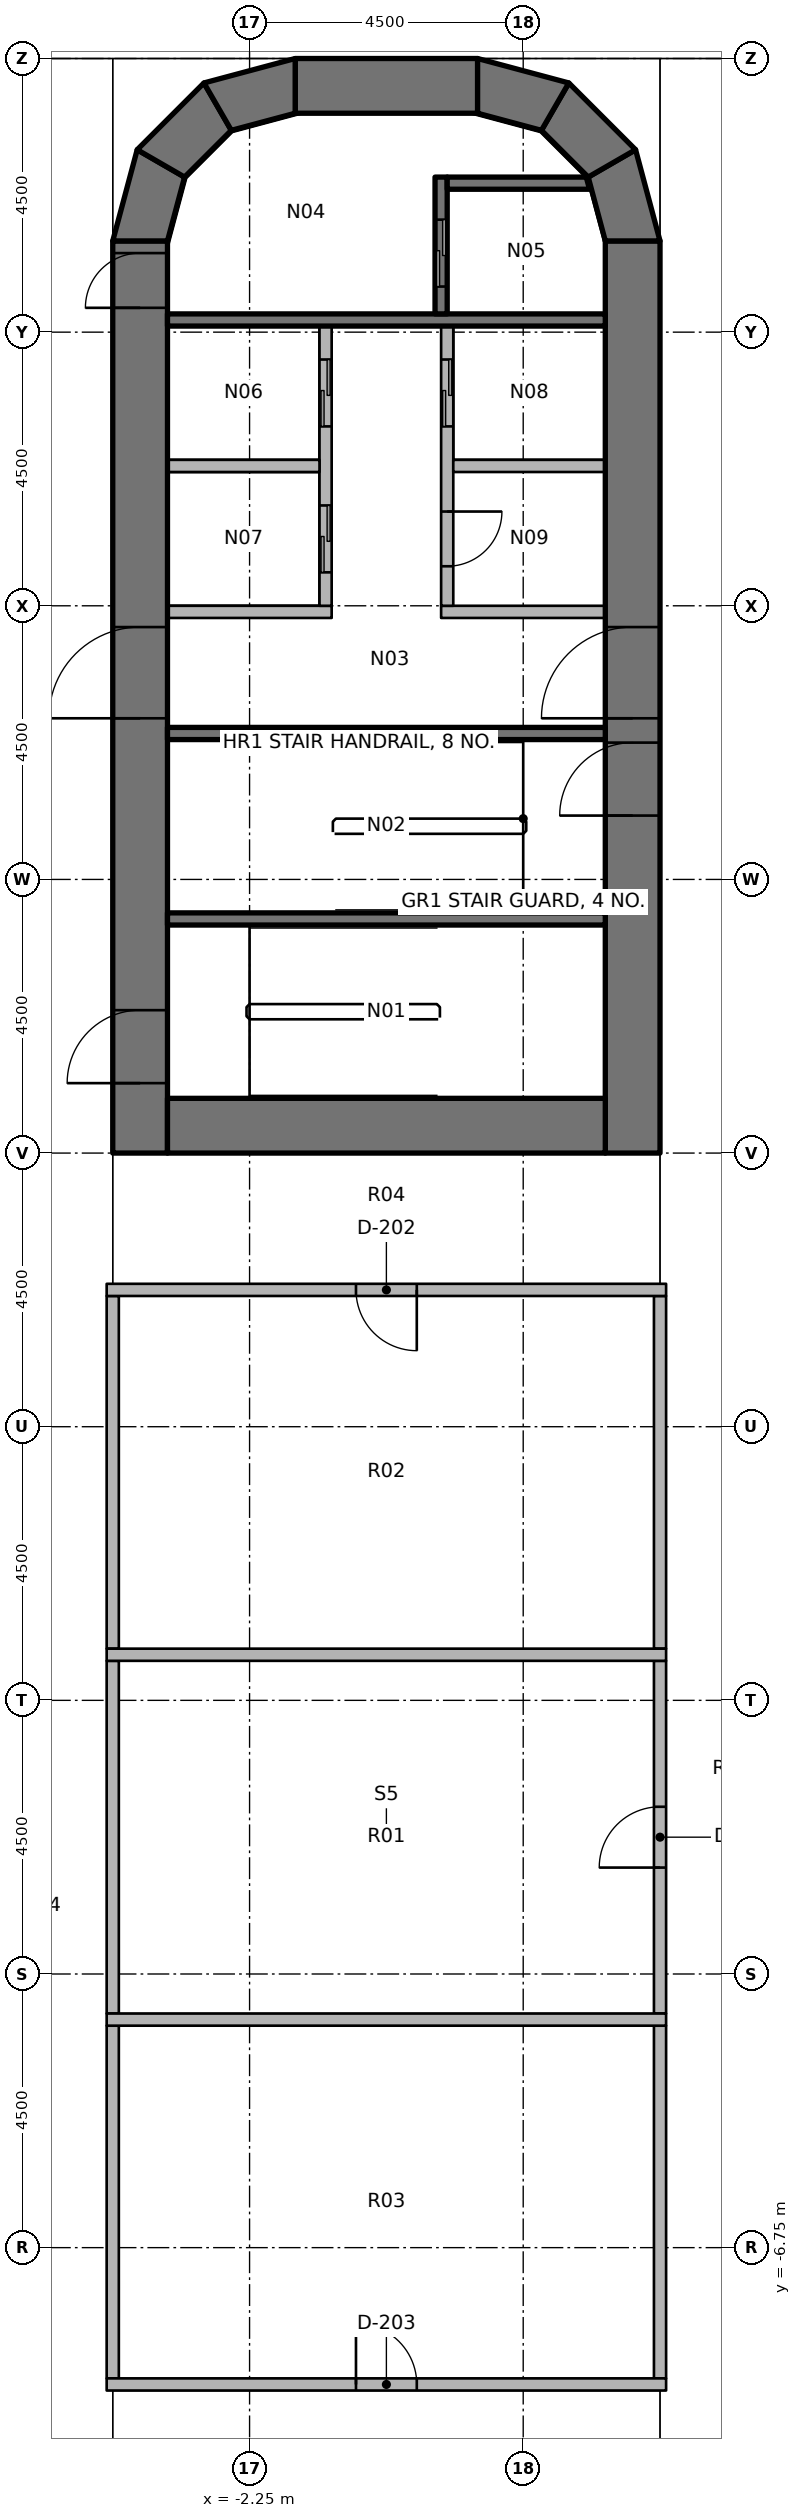
"""IFC4 building model, lengths in metres.
Left out: names, types, materials, properties, quantities, classifications, styles, units other than length and angle.
Written with IfcOpenShell. Run it as: python <this file> out.ifc"""

import sys

from ifc_helpers import new_model, si_unit, direction, frame, frame_2d, origin, place, context, subcontext, project, spatial, polyline, rectangle, outline, extrude, element, fill, save


model = new_model("IFC4")
c1 = context("Model", 3, precision=1e-05, world=origin(), true_north=direction((0.0, 1.0)))
c2 = subcontext(c1, "Body", "Model", "MODEL_VIEW")
j1 = project(units=[si_unit("LENGTHUNIT", "METRE"), si_unit("PLANEANGLEUNIT", "RADIAN")], contexts=[c1])
p1 = place(None, origin())
s1 = spatial("IfcSite", under=j1, at=p1, CompositionType="ELEMENT")
p2 = place(p1, origin())
s2 = spatial("IfcBuilding", under=s1, at=p2, CompositionType="ELEMENT")
p3 = place(p2, frame((0.0, 0.0, 31.2)))
s3 = spatial("IfcBuildingStorey", under=s2, at=p3, CompositionType="ELEMENT", Elevation=31.2)
p4 = place(p3, frame((-4.05, 11.25, 0.0), z_axis=(0.0, 0.0, 1.0), x_axis=(0.0, 1.0, 0.0)))
e1 = element("IfcWall", 1, at=p4, inside=s3, PredefinedType="SHEAR", context=c2, shape_type="SweptSolid", body=[
    extrude(rectangle(XDim=15.0, YDim=0.9, at=frame_2d((7.5, 0.0))), origin(), (0.0, 0.0, 1.0), 4.2),
])
p5 = place(p4, frame((7.15, 0.0, 0.0)))
e2 = element("IfcOpeningElement", 2, at=p5, cuts=e1, PredefinedType="OPENING", context=c2, shape_type="SweptSolid", body=[
    extrude(rectangle(XDim=1.5, YDim=2.3, at=frame_2d((0.75, 1.15))), frame((0.0, 0.46, 0.0), z_axis=(0.0, -1.0, 0.0), x_axis=(1.0, 0.0, 0.0)), (0.0, 0.0, 1.0), 0.92),
])
p6 = place(p4, frame((13.9, 0.0, 0.0)))
e3 = element("IfcOpeningElement", 3, at=p6, cuts=e1, PredefinedType="OPENING", context=c2, shape_type="SweptSolid", body=[
    extrude(rectangle(XDim=0.9, YDim=2.1, at=frame_2d((0.45, 1.05))), frame((0.0, 0.46, 0.0), z_axis=(0.0, -1.0, 0.0), x_axis=(1.0, 0.0, 0.0)), (0.0, 0.0, 1.0), 0.92),
])
p7 = place(p4, frame((1.15, 0.0, 0.0)))
e4 = element("IfcOpeningElement", 4, at=p7, cuts=e1, PredefinedType="OPENING", context=c2, shape_type="SweptSolid", body=[
    extrude(rectangle(XDim=1.2, YDim=2.1, at=frame_2d((0.6, 1.05))), frame((0.0, 0.46, 0.0), z_axis=(0.0, -1.0, 0.0), x_axis=(1.0, 0.0, 0.0)), (0.0, 0.0, 1.0), 0.92),
])
p8 = place(p3, frame((4.05, 11.25, 0.0), z_axis=(0.0, 0.0, 1.0), x_axis=(0.0, 1.0, 0.0)))
e5 = element("IfcWall", 5, at=p8, inside=s3, PredefinedType="SHEAR", context=c2, shape_type="SweptSolid", body=[
    extrude(rectangle(XDim=15.0, YDim=0.9, at=frame_2d((7.5, 0.0))), origin(), (0.0, 0.0, 1.0), 4.2),
])
p9 = place(p8, frame((7.15, 0.0, 0.0)))
e6 = element("IfcOpeningElement", 6, at=p9, cuts=e5, PredefinedType="OPENING", context=c2, shape_type="SweptSolid", body=[
    extrude(rectangle(XDim=1.5, YDim=2.3, at=frame_2d((0.75, 1.15))), frame((0.0, 0.46, 0.0), z_axis=(0.0, -1.0, 0.0), x_axis=(1.0, 0.0, 0.0)), (0.0, 0.0, 1.0), 0.92),
])
p10 = place(p8, frame((5.55, 0.0, 0.0)))
e7 = element("IfcOpeningElement", 7, at=p10, cuts=e5, PredefinedType="OPENING", context=c2, shape_type="SweptSolid", body=[
    extrude(rectangle(XDim=1.2, YDim=2.1, at=frame_2d((0.6, 1.05))), frame((0.0, 0.46, 0.0), z_axis=(0.0, -1.0, 0.0), x_axis=(1.0, 0.0, 0.0)), (0.0, 0.0, 1.0), 0.92),
])
p11 = place(p3, frame((-3.6, 11.7, 0.0), z_axis=(0.0, 0.0, 1.0), x_axis=(1.0, 0.0, 0.0)))
e8 = element("IfcWall", 8, at=p11, inside=s3, PredefinedType="SHEAR", context=c2, shape_type="SweptSolid", body=[
    extrude(rectangle(XDim=7.2, YDim=0.9, at=frame_2d((3.6, 0.0))), origin(), (0.0, 0.0, 1.0), 4.2),
])
p12 = place(p3, frame((-1.5, 28.8, 0.0), z_axis=(0.0, 0.0, 1.0), x_axis=(1.0, 0.0, 0.0)))
e9 = element("IfcWall", 9, at=p12, inside=s3, PredefinedType="SHEAR", context=c2, shape_type="SweptSolid", body=[
    extrude(rectangle(XDim=3.0, YDim=0.9, at=frame_2d((1.5, 0.0))), origin(), (0.0, 0.0, 1.0), 4.2),
])
p13 = place(p3, origin())
e10 = element("IfcWall", 10, at=p13, inside=s3, PredefinedType="SHEAR", context=c2, shape_type="SweptSolid", body=[
    extrude(outline(polyline([(-4.5, 26.25), (-4.098, 27.75), (-3.319, 27.3), (-3.6, 26.25), (-4.5, 26.25)])), origin(), (0.0, 0.0, 1.0), 4.2),
])
p14 = place(p3, origin())
e11 = element("IfcWall", 11, at=p14, inside=s3, PredefinedType="SHEAR", context=c2, shape_type="SweptSolid", body=[
    extrude(outline(polyline([(-4.098, 27.75), (-3.0, 28.848), (-2.55, 28.069), (-3.319, 27.3), (-4.098, 27.75)])), origin(), (0.0, 0.0, 1.0), 4.2),
])
p15 = place(p3, origin())
e12 = element("IfcWall", 12, at=p15, inside=s3, PredefinedType="SHEAR", context=c2, shape_type="SweptSolid", body=[
    extrude(outline(polyline([(-3.0, 28.848), (-1.5, 29.25), (-1.5, 28.35), (-2.55, 28.069), (-3.0, 28.848)])), origin(), (0.0, 0.0, 1.0), 4.2),
])
p16 = place(p3, origin())
e13 = element("IfcWall", 13, at=p16, inside=s3, PredefinedType="SHEAR", context=c2, shape_type="SweptSolid", body=[
    extrude(outline(polyline([(4.5, 26.25), (4.098, 27.75), (3.319, 27.3), (3.6, 26.25), (4.5, 26.25)])), origin(), (0.0, 0.0, 1.0), 4.2),
])
p17 = place(p3, origin())
e14 = element("IfcWall", 14, at=p17, inside=s3, PredefinedType="SHEAR", context=c2, shape_type="SweptSolid", body=[
    extrude(outline(polyline([(4.098, 27.75), (3.0, 28.848), (2.55, 28.069), (3.319, 27.3), (4.098, 27.75)])), origin(), (0.0, 0.0, 1.0), 4.2),
])
p18 = place(p3, origin())
e15 = element("IfcWall", 15, at=p18, inside=s3, PredefinedType="SHEAR", context=c2, shape_type="SweptSolid", body=[
    extrude(outline(polyline([(3.0, 28.848), (1.5, 29.25), (1.5, 28.35), (2.55, 28.069), (3.0, 28.848)])), origin(), (0.0, 0.0, 1.0), 4.2),
])
p19 = place(p3, frame((-3.6, 24.95, 0.0), z_axis=(0.0, 0.0, 1.0), x_axis=(1.0, 0.0, 0.0)))
e16 = element("IfcWall", 16, at=p19, inside=s3, PredefinedType="SHEAR", context=c2, shape_type="SweptSolid", body=[
    extrude(rectangle(XDim=7.2, YDim=0.2, at=frame_2d((3.6, 0.0))), origin(), (0.0, 0.0, 1.0), 4.05),
])
p20 = place(p3, frame((0.9, 27.3, 0.0), z_axis=(0.0, 0.0, 1.0), x_axis=(0.0, -1.0, 0.0)))
e17 = element("IfcWall", 17, at=p20, inside=s3, PredefinedType="SHEAR", context=c2, shape_type="SweptSolid", body=[
    extrude(rectangle(XDim=2.25, YDim=0.2, at=frame_2d((1.125, 0.0))), origin(), (0.0, 0.0, 1.0), 4.05),
])
p21 = place(p20, frame((0.7, 0.0, 0.0)))
e18 = element("IfcOpeningElement", 18, at=p21, cuts=e17, PredefinedType="OPENING", context=c2, shape_type="SweptSolid", body=[
    extrude(rectangle(XDim=1.1, YDim=2.3, at=frame_2d((0.55, 1.15))), frame((0.0, 0.11, 0.0), z_axis=(0.0, -1.0, 0.0), x_axis=(1.0, 0.0, 0.0)), (0.0, 0.0, 1.0), 0.22),
])
p22 = place(p3, origin())
e19 = element("IfcWall", 19, at=p22, inside=s3, PredefinedType="SHEAR", context=c2, shape_type="SweptSolid", body=[
    extrude(outline(polyline([(1.0, 27.1), (3.341, 27.1), (3.291, 27.284), (3.275, 27.3), (1.0, 27.3), (1.0, 27.1)])), origin(), (0.0, 0.0, 1.0), 4.05),
])
for number, where, z_axis, x_axis in (
    (20, (-3.6, 18.15, 0.0), (0.0, 0.0, 1.0), (1.0, 0.0, 0.0)),
    (21, (-3.6, 15.1, 0.0), (0.0, 0.0, 1.0), (1.0, 0.0, 0.0)),
):
    element("IfcWall", number, at=place(p3, frame(where, z_axis=z_axis, x_axis=x_axis)), inside=s3, PredefinedType="SHEAR", context=c2, shape_type="SweptSolid", body=[
        extrude(rectangle(XDim=7.2, YDim=0.2, at=frame_2d((3.6, 0.0))), origin(), (0.0, 0.0, 1.0), 4.05),
    ])
p23 = place(p3, frame((-3.6, 20.15, 0.0), z_axis=(0.0, 0.0, 1.0), x_axis=(1.0, 0.0, 0.0)))
e22 = element("IfcWall", 22, at=p23, inside=s3, PredefinedType="PARTITIONING", context=c2, shape_type="SweptSolid", body=[
    extrude(rectangle(XDim=2.7, YDim=0.2, at=frame_2d((1.35, 0.0))), origin(), (0.0, 0.0, 1.0), 4.05),
])
p24 = place(p3, frame((-1.0, 24.85, 0.0), z_axis=(0.0, 0.0, 1.0), x_axis=(0.0, -1.0, 0.0)))
e23 = element("IfcWall", 23, at=p24, inside=s3, PredefinedType="PARTITIONING", context=c2, shape_type="SweptSolid", body=[
    extrude(rectangle(XDim=4.6, YDim=0.2, at=frame_2d((2.3, 0.0))), origin(), (0.0, 0.0, 1.0), 4.05),
])
p25 = place(p24, frame((0.55, 0.0, 0.0)))
e24 = element("IfcOpeningElement", 24, at=p25, cuts=e23, PredefinedType="OPENING", context=c2, shape_type="SweptSolid", body=[
    extrude(rectangle(XDim=1.1, YDim=2.3, at=frame_2d((0.55, 1.15))), frame((0.0, 0.11, 0.0), z_axis=(0.0, -1.0, 0.0), x_axis=(1.0, 0.0, 0.0)), (0.0, 0.0, 1.0), 0.22),
])
p26 = place(p24, frame((2.95, 0.0, 0.0)))
e25 = element("IfcOpeningElement", 25, at=p26, cuts=e23, PredefinedType="OPENING", context=c2, shape_type="SweptSolid", body=[
    extrude(rectangle(XDim=1.1, YDim=2.3, at=frame_2d((0.55, 1.15))), frame((0.0, 0.11, 0.0), z_axis=(0.0, -1.0, 0.0), x_axis=(1.0, 0.0, 0.0)), (0.0, 0.0, 1.0), 0.22),
])
p27 = place(p3, frame((0.9, 20.15, 0.0), z_axis=(0.0, 0.0, 1.0), x_axis=(1.0, 0.0, 0.0)))
e26 = element("IfcWall", 26, at=p27, inside=s3, PredefinedType="PARTITIONING", context=c2, shape_type="SweptSolid", body=[
    extrude(rectangle(XDim=2.7, YDim=0.2, at=frame_2d((1.35, 0.0))), origin(), (0.0, 0.0, 1.0), 4.05),
])
p28 = place(p3, frame((1.0, 24.85, 0.0), z_axis=(0.0, 0.0, 1.0), x_axis=(0.0, -1.0, 0.0)))
e27 = element("IfcWall", 27, at=p28, inside=s3, PredefinedType="PARTITIONING", context=c2, shape_type="SweptSolid", body=[
    extrude(rectangle(XDim=4.6, YDim=0.2, at=frame_2d((2.3, 0.0))), origin(), (0.0, 0.0, 1.0), 4.05),
])
p29 = place(p28, frame((0.55, 0.0, 0.0)))
e28 = element("IfcOpeningElement", 28, at=p29, cuts=e27, PredefinedType="OPENING", context=c2, shape_type="SweptSolid", body=[
    extrude(rectangle(XDim=1.1, YDim=2.3, at=frame_2d((0.55, 1.15))), frame((0.0, 0.11, 0.0), z_axis=(0.0, -1.0, 0.0), x_axis=(1.0, 0.0, 0.0)), (0.0, 0.0, 1.0), 0.22),
])
p30 = place(p28, frame((3.05, 0.0, 0.0)))
e29 = element("IfcOpeningElement", 29, at=p30, cuts=e27, PredefinedType="OPENING", context=c2, shape_type="SweptSolid", body=[
    extrude(rectangle(XDim=0.9, YDim=2.1, at=frame_2d((0.45, 1.05))), frame((0.0, 0.11, 0.0), z_axis=(0.0, -1.0, 0.0), x_axis=(1.0, 0.0, 0.0)), (0.0, 0.0, 1.0), 0.22),
])
for number, where, z_axis, x_axis in (
    (30, (-3.6, 22.55, 0.0), (0.0, 0.0, 1.0), (1.0, 0.0, 0.0)),
    (31, (1.1, 22.55, 0.0), (0.0, 0.0, 1.0), (1.0, 0.0, 0.0)),
):
    element("IfcWall", number, at=place(p3, frame(where, z_axis=z_axis, x_axis=x_axis)), inside=s3, PredefinedType="PARTITIONING", context=c2, shape_type="SweptSolid", body=[
        extrude(rectangle(XDim=2.5, YDim=0.2, at=frame_2d((1.25, 0.0))), origin(), (0.0, 0.0, 1.0), 4.05),
    ])
for number, where, z_axis, x_axis in (
    (32, (-4.5, 3.1, 0.0), (0.0, 0.0, 1.0), (0.0, 1.0, 0.0)),
    (33, (-4.5, -2.9, 0.0), (0.0, 0.0, 1.0), (0.0, 1.0, 0.0)),
    (34, (-4.5, -8.9, 0.0), (0.0, 0.0, 1.0), (0.0, 1.0, 0.0)),
    (35, (4.5, 3.1, 0.0), (0.0, 0.0, 1.0), (0.0, 1.0, 0.0)),
):
    element("IfcWall", number, at=place(p3, frame(where, z_axis=z_axis, x_axis=x_axis)), inside=s3, PredefinedType="PARTITIONING", context=c2, shape_type="SweptSolid", body=[
        extrude(rectangle(XDim=5.8, YDim=0.2, at=frame_2d((2.9, 0.0))), origin(), (0.0, 0.0, 1.0), 3.131),
    ])
p31 = place(p3, frame((4.5, -2.9, 0.0), z_axis=(0.0, 0.0, 1.0), x_axis=(0.0, 1.0, 0.0)))
e36 = element("IfcWall", 36, at=p31, inside=s3, PredefinedType="PARTITIONING", context=c2, shape_type="SweptSolid", body=[
    extrude(rectangle(XDim=5.8, YDim=0.2, at=frame_2d((2.9, 0.0))), origin(), (0.0, 0.0, 1.0), 3.131),
])
p32 = place(p31, frame((2.4, 0.0, 0.0)))
e37 = element("IfcOpeningElement", 37, at=p32, cuts=e36, PredefinedType="OPENING", context=c2, shape_type="SweptSolid", body=[
    extrude(rectangle(XDim=1.0, YDim=2.1, at=frame_2d((0.5, 1.05))), frame((0.0, 0.11, 0.0), z_axis=(0.0, -1.0, 0.0), x_axis=(1.0, 0.0, 0.0)), (0.0, 0.0, 1.0), 0.22),
])
p33 = place(p3, frame((4.5, -8.9, 0.0), z_axis=(0.0, 0.0, 1.0), x_axis=(0.0, 1.0, 0.0)))
e38 = element("IfcWall", 38, at=p33, inside=s3, PredefinedType="PARTITIONING", context=c2, shape_type="SweptSolid", body=[
    extrude(rectangle(XDim=5.8, YDim=0.2, at=frame_2d((2.9, 0.0))), origin(), (0.0, 0.0, 1.0), 3.131),
])
p34 = place(p3, frame((4.6, 9.0, 0.0), z_axis=(0.0, 0.0, 1.0), x_axis=(-1.0, 0.0, 0.0)))
e39 = element("IfcWall", 39, at=p34, inside=s3, PredefinedType="PARTITIONING", context=c2, shape_type="SweptSolid", body=[
    extrude(rectangle(XDim=9.2, YDim=0.2, at=frame_2d((4.6, 0.0))), origin(), (0.0, 0.0, 1.0), 3.131),
])
p35 = place(p34, frame((4.1, 0.0, 0.0)))
e40 = element("IfcOpeningElement", 40, at=p35, cuts=e39, PredefinedType="OPENING", context=c2, shape_type="SweptSolid", body=[
    extrude(rectangle(XDim=1.0, YDim=2.1, at=frame_2d((0.5, 1.05))), frame((0.0, 0.11, 0.0), z_axis=(0.0, -1.0, 0.0), x_axis=(1.0, 0.0, 0.0)), (0.0, 0.0, 1.0), 0.22),
])
p36 = place(p3, frame((-4.6, -9.0, 0.0), z_axis=(0.0, 0.0, 1.0), x_axis=(1.0, 0.0, 0.0)))
e41 = element("IfcWall", 41, at=p36, inside=s3, PredefinedType="PARTITIONING", context=c2, shape_type="SweptSolid", body=[
    extrude(rectangle(XDim=9.2, YDim=0.2, at=frame_2d((4.6, 0.0))), origin(), (0.0, 0.0, 1.0), 3.131),
])
p37 = place(p36, frame((4.1, 0.0, 0.0)))
e42 = element("IfcOpeningElement", 42, at=p37, cuts=e41, PredefinedType="OPENING", context=c2, shape_type="SweptSolid", body=[
    extrude(rectangle(XDim=1.0, YDim=2.1, at=frame_2d((0.5, 1.05))), frame((0.0, 0.11, 0.0), z_axis=(0.0, -1.0, 0.0), x_axis=(1.0, 0.0, 0.0)), (0.0, 0.0, 1.0), 0.22),
])
for number, where, z_axis, x_axis in (
    (43, (-4.6, 3.0, 0.0), (0.0, 0.0, 1.0), (1.0, 0.0, 0.0)),
    (44, (-4.6, -3.0, 0.0), (0.0, 0.0, 1.0), (1.0, 0.0, 0.0)),
):
    element("IfcWall", number, at=place(p3, frame(where, z_axis=z_axis, x_axis=x_axis)), inside=s3, PredefinedType="PARTITIONING", context=c2, shape_type="SweptSolid", body=[
        extrude(rectangle(XDim=9.2, YDim=0.2, at=frame_2d((4.6, 0.0))), origin(), (0.0, 0.0, 1.0), 3.131),
    ])
p38 = place(p5, origin())
e45 = element("IfcDoor", 45, at=p38, inside=s3, OperationType="DOUBLE_DOOR_SINGLE_SWING", PredefinedType="DOOR", context=c2, shape_type="SweptSolid", body=[
    extrude(rectangle(XDim=1.5, YDim=2.3, at=frame_2d((0.75, 1.15))), frame((0.0, 0.025, 0.0), z_axis=(0.0, -1.0, 0.0), x_axis=(1.0, 0.0, 0.0)), (0.0, 0.0, 1.0), 0.05),
])
fill(e2, e45)
p39 = place(p9, origin())
e46 = element("IfcDoor", 46, at=p39, inside=s3, OperationType="DOUBLE_DOOR_SINGLE_SWING", PredefinedType="DOOR", context=c2, shape_type="SweptSolid", body=[
    extrude(rectangle(XDim=1.5, YDim=2.3, at=frame_2d((0.75, 1.15))), frame((0.0, 0.025, 0.0), z_axis=(0.0, -1.0, 0.0), x_axis=(1.0, 0.0, 0.0)), (0.0, 0.0, 1.0), 0.05),
])
fill(e6, e46)
p40 = place(p6, origin())
e47 = element("IfcDoor", 47, at=p40, inside=s3, OperationType="SINGLE_SWING_LEFT", PredefinedType="DOOR", context=c2, shape_type="SweptSolid", body=[
    extrude(rectangle(XDim=0.9, YDim=2.1, at=frame_2d((0.45, 1.05))), frame((0.0, 0.025, 0.0), z_axis=(0.0, -1.0, 0.0), x_axis=(1.0, 0.0, 0.0)), (0.0, 0.0, 1.0), 0.05),
])
fill(e3, e47)
p41 = place(p10, origin())
e48 = element("IfcDoor", 48, at=p41, inside=s3, OperationType="SINGLE_SWING_RIGHT", PredefinedType="DOOR", context=c2, shape_type="SweptSolid", body=[
    extrude(rectangle(XDim=1.2, YDim=2.1, at=frame_2d((0.6, 1.05))), frame((0.0, 0.025, 0.0), z_axis=(0.0, -1.0, 0.0), x_axis=(1.0, 0.0, 0.0)), (0.0, 0.0, 1.0), 0.05),
])
fill(e7, e48)
p42 = place(p7, origin())
e49 = element("IfcDoor", 49, at=p42, inside=s3, OperationType="SINGLE_SWING_RIGHT", PredefinedType="DOOR", context=c2, shape_type="SweptSolid", body=[
    extrude(rectangle(XDim=1.2, YDim=2.1, at=frame_2d((0.6, 1.05))), frame((0.0, 0.025, 0.0), z_axis=(0.0, -1.0, 0.0), x_axis=(1.0, 0.0, 0.0)), (0.0, 0.0, 1.0), 0.05),
])
fill(e4, e49)
p43 = place(p21, origin())
e50 = element("IfcDoor", 50, at=p43, inside=s3, OperationType="DOUBLE_DOOR_SLIDING", PredefinedType="DOOR", context=c2, shape_type="SweptSolid", body=[
    extrude(rectangle(XDim=1.1, YDim=2.3, at=frame_2d((0.55, 1.15))), frame((0.0, 0.025, 0.0), z_axis=(0.0, -1.0, 0.0), x_axis=(1.0, 0.0, 0.0)), (0.0, 0.0, 1.0), 0.05),
])
fill(e18, e50)
p44 = place(p25, origin())
e51 = element("IfcDoor", 51, at=p44, inside=s3, OperationType="DOUBLE_DOOR_SLIDING", PredefinedType="DOOR", context=c2, shape_type="SweptSolid", body=[
    extrude(rectangle(XDim=1.1, YDim=2.3, at=frame_2d((0.55, 1.15))), frame((0.0, 0.025, 0.0), z_axis=(0.0, -1.0, 0.0), x_axis=(1.0, 0.0, 0.0)), (0.0, 0.0, 1.0), 0.05),
])
fill(e24, e51)
p45 = place(p26, origin())
e52 = element("IfcDoor", 52, at=p45, inside=s3, OperationType="DOUBLE_DOOR_SLIDING", PredefinedType="DOOR", context=c2, shape_type="SweptSolid", body=[
    extrude(rectangle(XDim=1.1, YDim=2.3, at=frame_2d((0.55, 1.15))), frame((0.0, 0.025, 0.0), z_axis=(0.0, -1.0, 0.0), x_axis=(1.0, 0.0, 0.0)), (0.0, 0.0, 1.0), 0.05),
])
fill(e25, e52)
p46 = place(p29, origin())
e53 = element("IfcDoor", 53, at=p46, inside=s3, OperationType="DOUBLE_DOOR_SLIDING", PredefinedType="DOOR", context=c2, shape_type="SweptSolid", body=[
    extrude(rectangle(XDim=1.1, YDim=2.3, at=frame_2d((0.55, 1.15))), frame((0.0, 0.025, 0.0), z_axis=(0.0, -1.0, 0.0), x_axis=(1.0, 0.0, 0.0)), (0.0, 0.0, 1.0), 0.05),
])
fill(e28, e53)
p47 = place(p30, origin())
e54 = element("IfcDoor", 54, at=p47, inside=s3, OperationType="SINGLE_SWING_RIGHT", PredefinedType="DOOR", context=c2, shape_type="SweptSolid", body=[
    extrude(rectangle(XDim=0.9, YDim=2.1, at=frame_2d((0.45, 1.05))), frame((0.0, 0.025, 0.0), z_axis=(0.0, -1.0, 0.0), x_axis=(1.0, 0.0, 0.0)), (0.0, 0.0, 1.0), 0.05),
])
fill(e29, e54)
p48 = place(p32, origin())
e55 = element("IfcDoor", 55, at=p48, inside=s3, OperationType="SINGLE_SWING_RIGHT", PredefinedType="DOOR", context=c2, shape_type="SweptSolid", body=[
    extrude(rectangle(XDim=1.0, YDim=2.1, at=frame_2d((0.5, 1.05))), frame((0.0, 0.025, 0.0), z_axis=(0.0, -1.0, 0.0), x_axis=(1.0, 0.0, 0.0)), (0.0, 0.0, 1.0), 0.05),
])
fill(e37, e55)
p49 = place(p35, origin())
e56 = element("IfcDoor", 56, at=p49, inside=s3, OperationType="SINGLE_SWING_RIGHT", PredefinedType="DOOR", context=c2, shape_type="SweptSolid", body=[
    extrude(rectangle(XDim=1.0, YDim=2.1, at=frame_2d((0.5, 1.05))), frame((0.0, 0.025, 0.0), z_axis=(0.0, -1.0, 0.0), x_axis=(1.0, 0.0, 0.0)), (0.0, 0.0, 1.0), 0.05),
])
fill(e40, e56)
p50 = place(p37, origin())
e57 = element("IfcDoor", 57, at=p50, inside=s3, OperationType="SINGLE_SWING_RIGHT", PredefinedType="DOOR", context=c2, shape_type="SweptSolid", body=[
    extrude(rectangle(XDim=1.0, YDim=2.1, at=frame_2d((0.5, 1.05))), frame((0.0, 0.025, 0.0), z_axis=(0.0, -1.0, 0.0), x_axis=(1.0, 0.0, 0.0)), (0.0, 0.0, 1.0), 0.05),
])
fill(e42, e57)
save(model, sys.argv[1])
